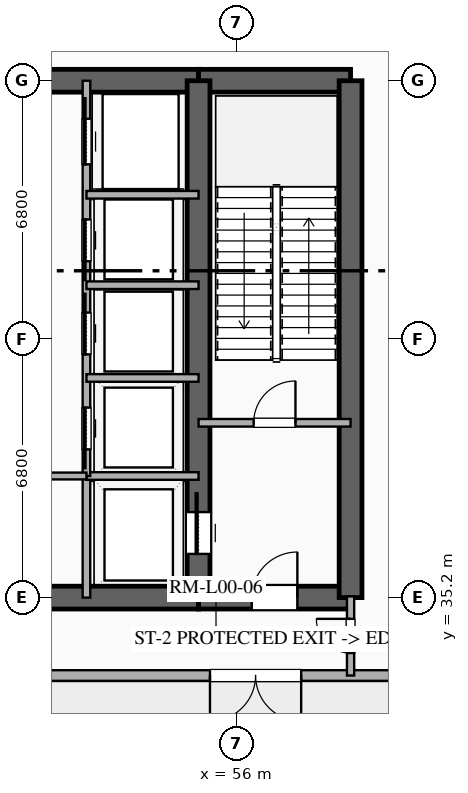
"""IFC4 building model, lengths in metres.
Left out: names, types, materials, properties, quantities, classifications, styles, units other than length and angle.
Written with IfcOpenShell. Run it as: python <this file> out.ifc"""

import sys

from ifc_helpers import new_model, si_unit, direction, frame, frame_2d, origin, place, context, subcontext, project, spatial, rectangle, extrude, element, fill, save


model = new_model("IFC4")
c1 = context("Model", 3, precision=1e-05, world=origin(), true_north=direction((0.0, 1.0)))
c2 = subcontext(c1, "Body", "Model", "MODEL_VIEW")
j1 = project(units=[si_unit("LENGTHUNIT", "METRE"), si_unit("PLANEANGLEUNIT", "RADIAN")], contexts=[c1])
p1 = place(None, origin())
s1 = spatial("IfcSite", under=j1, at=p1, CompositionType="ELEMENT")
p2 = place(p1, origin())
s2 = spatial("IfcBuilding", under=s1, at=p2, CompositionType="ELEMENT")
p3 = place(p2, origin())
s3 = spatial("IfcBuildingStorey", under=s2, at=p3, CompositionType="ELEMENT", Elevation=0.0)
p4 = place(p3, frame((41.0, 35.2, 0.0), z_axis=(0.0, 0.0, 1.0), x_axis=(1.0, 0.0, 0.0)))
e1 = element("IfcWall", 1, at=p4, inside=s3, PredefinedType="SHEAR", context=c2, shape_type="SweptSolid", body=[
    extrude(rectangle(XDim=14.0, YDim=0.6, at=frame_2d((7.0, 0.0))), origin(), (0.0, 0.0, 1.0), 5.72),
])
p5 = place(p4, frame((6.1, 0.0, 0.0)))
e2 = element("IfcOpeningElement", 2, at=p5, cuts=e1, PredefinedType="OPENING", context=c2, shape_type="SweptSolid", body=[
    extrude(rectangle(XDim=1.8, YDim=2.25, at=frame_2d((0.9, 1.125))), frame((0.0, 0.31, 0.0), z_axis=(0.0, -1.0, 0.0), x_axis=(1.0, 0.0, 0.0)), (0.0, 0.0, 1.0), 0.62),
])
p6 = place(p3, frame((55.0, 35.2, 0.0), z_axis=(0.0, 0.0, 1.0), x_axis=(1.0, 0.0, 0.0)))
e3 = element("IfcWall", 3, at=p6, inside=s3, PredefinedType="SHEAR", context=c2, shape_type="SweptSolid", body=[
    extrude(rectangle(XDim=4.0, YDim=0.6, at=frame_2d((2.0, 0.0))), origin(), (0.0, 0.0, 1.0), 5.72),
])
p7 = place(p6, frame((1.4, 0.0, 0.0)))
e4 = element("IfcOpeningElement", 4, at=p7, cuts=e3, PredefinedType="OPENING", context=c2, shape_type="SweptSolid", body=[
    extrude(rectangle(XDim=1.2, YDim=2.15, at=frame_2d((0.6, 1.075))), frame((0.0, 0.31, 0.0), z_axis=(0.0, -1.0, 0.0), x_axis=(1.0, 0.0, 0.0)), (0.0, 0.0, 1.0), 0.62),
])
p8 = place(p3, frame((41.0, 48.8, 0.0), z_axis=(0.0, 0.0, 1.0), x_axis=(1.0, 0.0, 0.0)))
e5 = element("IfcWall", 5, at=p8, inside=s3, PredefinedType="SHEAR", context=c2, shape_type="SweptSolid", body=[
    extrude(rectangle(XDim=14.0, YDim=0.6, at=frame_2d((7.0, 0.0))), origin(), (0.0, 0.0, 1.0), 5.72),
])
p9 = place(p8, frame((6.1, 0.0, 0.0)))
e6 = element("IfcOpeningElement", 6, at=p9, cuts=e5, PredefinedType="OPENING", context=c2, shape_type="SweptSolid", body=[
    extrude(rectangle(XDim=1.8, YDim=2.25, at=frame_2d((0.9, 1.125))), frame((0.0, 0.31, 0.0), z_axis=(0.0, -1.0, 0.0), x_axis=(1.0, 0.0, 0.0)), (0.0, 0.0, 1.0), 0.62),
])
p10 = place(p3, frame((55.0, 48.8, 0.0), z_axis=(0.0, 0.0, 1.0), x_axis=(1.0, 0.0, 0.0)))
e7 = element("IfcWall", 7, at=p10, inside=s3, PredefinedType="SHEAR", context=c2, shape_type="SweptSolid", body=[
    extrude(rectangle(XDim=4.0, YDim=0.6, at=frame_2d((2.0, 0.0))), origin(), (0.0, 0.0, 1.0), 5.72),
])
p11 = place(p3, frame((59.0, 35.2, 0.0), z_axis=(0.0, 0.0, 1.0), x_axis=(0.0, 1.0, 0.0)))
e8 = element("IfcWall", 8, at=p11, inside=s3, PredefinedType="SHEAR", context=c2, shape_type="SweptSolid", body=[
    extrude(rectangle(XDim=13.6, YDim=0.6, at=frame_2d((6.8, 0.0))), origin(), (0.0, 0.0, 1.0), 5.72),
])
p12 = place(p3, frame((55.0, 35.2, 0.0), z_axis=(0.0, 0.0, 1.0), x_axis=(0.0, 1.0, 0.0)))
e9 = element("IfcWall", 9, at=p12, inside=s3, PredefinedType="SHEAR", context=c2, shape_type="SweptSolid", body=[
    extrude(rectangle(XDim=13.6, YDim=0.6, at=frame_2d((6.8, 0.0))), origin(), (0.0, 0.0, 1.0), 5.72),
])
p13 = place(p12, frame((1.15, 0.0, 0.0)))
e10 = element("IfcOpeningElement", 10, at=p13, cuts=e9, PredefinedType="OPENING", context=c2, shape_type="SweptSolid", body=[
    extrude(rectangle(XDim=1.1, YDim=2.2, at=frame_2d((0.55, 1.1))), frame((0.0, 0.31, 0.0), z_axis=(0.0, -1.0, 0.0), x_axis=(1.0, 0.0, 0.0)), (0.0, 0.0, 1.0), 0.62),
])
p14 = place(p3, frame((88.0, 33.15, 0.0), z_axis=(0.0, 0.0, 1.0), x_axis=(-1.0, 0.0, 0.0)))
e11 = element("IfcWall", 11, at=p14, inside=s3, PredefinedType="SOLIDWALL", context=c2, shape_type="SweptSolid", body=[
    extrude(rectangle(XDim=80.0, YDim=0.28, at=frame_2d((40.0, 0.0))), origin(), (0.0, 0.0, 1.0), 5.72),
])
p15 = place(p14, frame((47.3, 0.0, 0.0)))
e12 = element("IfcOpeningElement", 12, at=p15, cuts=e11, PredefinedType="OPENING", context=c2, shape_type="SweptSolid", body=[
    extrude(rectangle(XDim=2.4, YDim=2.6, at=frame_2d((1.2, 1.3))), frame((0.0, 0.15, 0.0), z_axis=(0.0, -1.0, 0.0), x_axis=(1.0, 0.0, 0.0)), (0.0, 0.0, 1.0), 0.3),
])
p16 = place(p14, frame((38.8, 0.0, 0.0)))
e13 = element("IfcOpeningElement", 13, at=p16, cuts=e11, PredefinedType="OPENING", context=c2, shape_type="SweptSolid", body=[
    extrude(rectangle(XDim=2.4, YDim=2.6, at=frame_2d((1.2, 1.3))), frame((0.0, 0.15, 0.0), z_axis=(0.0, -1.0, 0.0), x_axis=(1.0, 0.0, 0.0)), (0.0, 0.0, 1.0), 0.3),
])
p17 = place(p14, frame((30.3, 0.0, 0.0)))
e14 = element("IfcOpeningElement", 14, at=p17, cuts=e11, PredefinedType="OPENING", context=c2, shape_type="SweptSolid", body=[
    extrude(rectangle(XDim=2.4, YDim=2.6, at=frame_2d((1.2, 1.3))), frame((0.0, 0.15, 0.0), z_axis=(0.0, -1.0, 0.0), x_axis=(1.0, 0.0, 0.0)), (0.0, 0.0, 1.0), 0.3),
])
p18 = place(p3, frame((55.0, 39.8, 0.0), z_axis=(0.0, 0.0, 1.0), x_axis=(1.0, 0.0, 0.0)))
e15 = element("IfcWall", 15, at=p18, inside=s3, PredefinedType="SOLIDWALL", context=c2, shape_type="SweptSolid", body=[
    extrude(rectangle(XDim=4.0, YDim=0.2, at=frame_2d((2.0, 0.0))), origin(), (0.0, 0.0, 1.0), 4.92),
])
p19 = place(p18, frame((1.45, 0.0, 0.0)))
e16 = element("IfcOpeningElement", 16, at=p19, cuts=e15, PredefinedType="OPENING", context=c2, shape_type="SweptSolid", body=[
    extrude(rectangle(XDim=1.1, YDim=2.15, at=frame_2d((0.55, 1.075))), frame((0.0, 0.11, 0.0), z_axis=(0.0, -1.0, 0.0), x_axis=(1.0, 0.0, 0.0)), (0.0, 0.0, 1.0), 0.22),
])
p20 = place(p3, frame((52.05, 35.2, 0.0), z_axis=(0.0, 0.0, 1.0), x_axis=(0.0, 1.0, 0.0)))
e17 = element("IfcWall", 17, at=p20, inside=s3, PredefinedType="SOLIDWALL", context=c2, shape_type="SweptSolid", body=[
    extrude(rectangle(XDim=3.2, YDim=0.2, at=frame_2d((1.6, 0.0))), origin(), (0.0, 0.0, 1.0), 4.92),
])
p21 = place(p3, frame((52.05, 38.4, 0.0), z_axis=(0.0, 0.0, 1.0), x_axis=(1.0, 0.0, 0.0)))
e18 = element("IfcWall", 18, at=p21, inside=s3, PredefinedType="SOLIDWALL", context=c2, shape_type="SweptSolid", body=[
    extrude(rectangle(XDim=2.95, YDim=0.2, at=frame_2d((1.475, 0.0))), origin(), (0.0, 0.0, 1.0), 4.92),
])
p22 = place(p3, frame((52.05, 38.4, 0.0), z_axis=(0.0, 0.0, 1.0), x_axis=(0.0, 1.0, 0.0)))
e19 = element("IfcWall", 19, at=p22, inside=s3, PredefinedType="SOLIDWALL", context=c2, shape_type="SweptSolid", body=[
    extrude(rectangle(XDim=10.4, YDim=0.2, at=frame_2d((5.2, 0.0))), origin(), (0.0, 0.0, 1.0), 4.92),
])
p23 = place(p22, frame((0.7, 0.0, 0.0)))
e20 = element("IfcOpeningElement", 20, at=p23, cuts=e19, PredefinedType="OPENING", context=c2, shape_type="SweptSolid", body=[
    extrude(rectangle(XDim=1.1, YDim=2.2, at=frame_2d((0.55, 1.1))), frame((0.0, 0.11, 0.0), z_axis=(0.0, -1.0, 0.0), x_axis=(1.0, 0.0, 0.0)), (0.0, 0.0, 1.0), 0.22),
])
p24 = place(p22, frame((3.2, 0.0, 0.0)))
e21 = element("IfcOpeningElement", 21, at=p24, cuts=e19, PredefinedType="OPENING", context=c2, shape_type="SweptSolid", body=[
    extrude(rectangle(XDim=1.1, YDim=2.2, at=frame_2d((0.55, 1.1))), frame((0.0, 0.11, 0.0), z_axis=(0.0, -1.0, 0.0), x_axis=(1.0, 0.0, 0.0)), (0.0, 0.0, 1.0), 0.22),
])
p25 = place(p22, frame((5.65, 0.0, 0.0)))
e22 = element("IfcOpeningElement", 22, at=p25, cuts=e19, PredefinedType="OPENING", context=c2, shape_type="SweptSolid", body=[
    extrude(rectangle(XDim=1.1, YDim=2.2, at=frame_2d((0.55, 1.1))), frame((0.0, 0.11, 0.0), z_axis=(0.0, -1.0, 0.0), x_axis=(1.0, 0.0, 0.0)), (0.0, 0.0, 1.0), 0.22),
])
p26 = place(p22, frame((8.2, 0.0, 0.0)))
e23 = element("IfcOpeningElement", 23, at=p26, cuts=e19, PredefinedType="OPENING", context=c2, shape_type="SweptSolid", body=[
    extrude(rectangle(XDim=1.2, YDim=2.2, at=frame_2d((0.6, 1.1))), frame((0.0, 0.11, 0.0), z_axis=(0.0, -1.0, 0.0), x_axis=(1.0, 0.0, 0.0)), (0.0, 0.0, 1.0), 0.22),
])
for number, where, z_axis, x_axis in (
    (24, (52.05, 40.98, 0.0), (0.0, 0.0, 1.0), (1.0, 0.0, 0.0)),
    (25, (52.05, 43.42, 0.0), (0.0, 0.0, 1.0), (1.0, 0.0, 0.0)),
    (26, (52.05, 45.8, 0.0), (0.0, 0.0, 1.0), (1.0, 0.0, 0.0)),
):
    element("IfcWall", number, at=place(p3, frame(where, z_axis=z_axis, x_axis=x_axis)), inside=s3, PredefinedType="SOLIDWALL", context=c2, shape_type="SweptSolid", body=[
        extrude(rectangle(XDim=2.95, YDim=0.2, at=frame_2d((1.475, 0.0))), origin(), (0.0, 0.0, 1.0), 4.92),
    ])
p27 = place(p3, frame((49.2, 38.4, 0.0), z_axis=(0.0, 0.0, 1.0), x_axis=(1.0, 0.0, 0.0)))
e27 = element("IfcWall", 27, at=p27, inside=s3, PredefinedType="PLUMBINGWALL", context=c2, shape_type="SweptSolid", body=[
    extrude(rectangle(XDim=2.85, YDim=0.18, at=frame_2d((1.425, 0.0))), origin(), (0.0, 0.0, 1.0), 4.92),
])
p28 = place(p3, frame((59.0, 33.15, 0.0), z_axis=(0.0, 0.0, 1.0), x_axis=(0.0, 1.0, 0.0)))
e28 = element("IfcWall", 28, at=p28, inside=s3, PredefinedType="PARTITIONING", context=c2, shape_type="SweptSolid", body=[
    extrude(rectangle(XDim=2.082, YDim=0.19, at=frame_2d((1.041, 0.0))), origin(), (0.0, 0.0, 1.0), 4.92),
])
p29 = place(p28, frame((0.591, 0.0, 0.0)))
e29 = element("IfcOpeningElement", 29, at=p29, cuts=e28, PredefinedType="OPENING", context=c2, shape_type="SweptSolid", body=[
    extrude(rectangle(XDim=0.9, YDim=2.15, at=frame_2d((0.45, 1.075))), frame((0.0, 0.105, 0.0), z_axis=(0.0, -1.0, 0.0), x_axis=(1.0, 0.0, 0.0)), (0.0, 0.0, 1.0), 0.21),
])
p30 = place(p17, origin())
e30 = element("IfcDoor", 30, at=p30, inside=s3, OperationType="DOUBLE_DOOR_SINGLE_SWING", PredefinedType="DOOR", context=c2, shape_type="SweptSolid", body=[
    extrude(rectangle(XDim=2.4, YDim=2.6, at=frame_2d((1.2, 1.3))), frame((0.0, 0.025, 0.0), z_axis=(0.0, -1.0, 0.0), x_axis=(1.0, 0.0, 0.0)), (0.0, 0.0, 1.0), 0.05),
])
fill(e14, e30)
p31 = place(p13, origin())
e31 = element("IfcDoor", 31, at=p31, inside=s3, OperationType="SLIDING_TO_RIGHT", PredefinedType="DOOR", context=c2, shape_type="SweptSolid", body=[
    extrude(rectangle(XDim=1.1, YDim=2.2, at=frame_2d((0.55, 1.1))), frame((0.0, 0.025, 0.0), z_axis=(0.0, -1.0, 0.0), x_axis=(1.0, 0.0, 0.0)), (0.0, 0.0, 1.0), 0.05),
])
fill(e10, e31)
p32 = place(p7, origin())
e32 = element("IfcDoor", 32, at=p32, inside=s3, OperationType="SINGLE_SWING_RIGHT", PredefinedType="DOOR", context=c2, shape_type="SweptSolid", body=[
    extrude(rectangle(XDim=1.2, YDim=2.15, at=frame_2d((0.6, 1.075))), frame((0.0, 0.025, 0.0), z_axis=(0.0, -1.0, 0.0), x_axis=(1.0, 0.0, 0.0)), (0.0, 0.0, 1.0), 0.05),
])
fill(e4, e32)
p33 = place(p19, origin())
e33 = element("IfcDoor", 33, at=p33, inside=s3, OperationType="SINGLE_SWING_RIGHT", PredefinedType="DOOR", context=c2, shape_type="SweptSolid", body=[
    extrude(rectangle(XDim=1.1, YDim=2.15, at=frame_2d((0.55, 1.075))), frame((0.0, 0.025, 0.0), z_axis=(0.0, -1.0, 0.0), x_axis=(1.0, 0.0, 0.0)), (0.0, 0.0, 1.0), 0.05),
])
fill(e16, e33)
p34 = place(p23, origin())
e34 = element("IfcDoor", 34, at=p34, inside=s3, OperationType="SLIDING_TO_LEFT", PredefinedType="DOOR", context=c2, shape_type="SweptSolid", body=[
    extrude(rectangle(XDim=1.1, YDim=2.2, at=frame_2d((0.55, 1.1))), frame((0.0, 0.025, 0.0), z_axis=(0.0, -1.0, 0.0), x_axis=(1.0, 0.0, 0.0)), (0.0, 0.0, 1.0), 0.05),
])
fill(e20, e34)
p35 = place(p24, origin())
e35 = element("IfcDoor", 35, at=p35, inside=s3, OperationType="SLIDING_TO_RIGHT", PredefinedType="DOOR", context=c2, shape_type="SweptSolid", body=[
    extrude(rectangle(XDim=1.1, YDim=2.2, at=frame_2d((0.55, 1.1))), frame((0.0, 0.025, 0.0), z_axis=(0.0, -1.0, 0.0), x_axis=(1.0, 0.0, 0.0)), (0.0, 0.0, 1.0), 0.05),
])
fill(e21, e35)
p36 = place(p25, origin())
e36 = element("IfcDoor", 36, at=p36, inside=s3, OperationType="SLIDING_TO_LEFT", PredefinedType="DOOR", context=c2, shape_type="SweptSolid", body=[
    extrude(rectangle(XDim=1.1, YDim=2.2, at=frame_2d((0.55, 1.1))), frame((0.0, 0.025, 0.0), z_axis=(0.0, -1.0, 0.0), x_axis=(1.0, 0.0, 0.0)), (0.0, 0.0, 1.0), 0.05),
])
fill(e22, e36)
p37 = place(p26, origin())
e37 = element("IfcDoor", 37, at=p37, inside=s3, OperationType="SLIDING_TO_RIGHT", PredefinedType="DOOR", context=c2, shape_type="SweptSolid", body=[
    extrude(rectangle(XDim=1.2, YDim=2.2, at=frame_2d((0.6, 1.1))), frame((0.0, 0.025, 0.0), z_axis=(0.0, -1.0, 0.0), x_axis=(1.0, 0.0, 0.0)), (0.0, 0.0, 1.0), 0.05),
])
fill(e23, e37)
p38 = place(p29, origin())
e38 = element("IfcDoor", 38, at=p38, inside=s3, OperationType="SINGLE_SWING_RIGHT", PredefinedType="DOOR", context=c2, shape_type="SweptSolid", body=[
    extrude(rectangle(XDim=0.9, YDim=2.15, at=frame_2d((0.45, 1.075))), frame((0.0, 0.025, 0.0), z_axis=(0.0, -1.0, 0.0), x_axis=(1.0, 0.0, 0.0)), (0.0, 0.0, 1.0), 0.05),
])
fill(e29, e38)
save(model, sys.argv[1])
